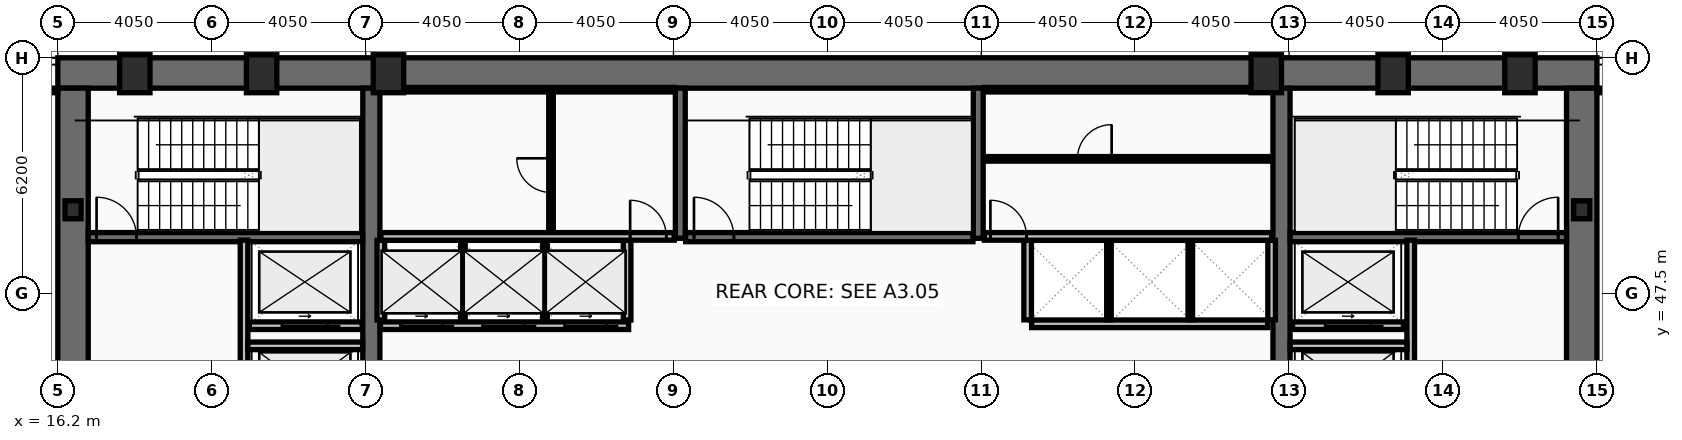
"""IFC4 building model, lengths in metres.
Left out: names, types, materials, properties, quantities, classifications, styles, units other than length and angle.
Written with IfcOpenShell. Run it as: python <this file> out.ifc"""

import sys

from ifc_helpers import new_model, si_unit, direction, frame, frame_2d, origin, origin_2d, place, context, subcontext, project, spatial, rectangle, hollow_rectangle, i_section, extrude, element, fill, save


model = new_model("IFC4")
c1 = context("Model", 3, precision=1e-05, world=origin(), true_north=direction((0.0, 1.0)))
c2 = subcontext(c1, "Body", "Model", "MODEL_VIEW")
j1 = project(units=[si_unit("LENGTHUNIT", "METRE"), si_unit("PLANEANGLEUNIT", "RADIAN")], contexts=[c1])
p1 = place(None, origin())
s1 = spatial("IfcSite", under=j1, at=p1, CompositionType="ELEMENT")
p2 = place(p1, origin())
s2 = spatial("IfcBuilding", under=s1, at=p2, CompositionType="ELEMENT")
p3 = place(p2, frame((0.0, 0.0, 37.8)))
s3 = spatial("IfcBuildingStorey", under=s2, at=p3, CompositionType="ELEMENT", Elevation=37.8)
p4 = place(p3, frame((16.2, 53.3, 0.0), z_axis=(0.0, 0.0, 1.0), x_axis=(1.0, 0.0, 0.0)))
e1 = element("IfcWall", 1, at=p4, inside=s3, PredefinedType="SHEAR", context=c2, shape_type="SweptSolid", body=[
    extrude(rectangle(XDim=40.5, YDim=0.8, at=frame_2d((20.25, 0.0))), origin(), (0.0, 0.0, 1.0), 3.82),
])
for number, where, z_axis, x_axis in (
    (2, (16.6, 42.1, 0.0), (0.0, 0.0, 1.0), (0.0, 1.0, 0.0)),
    (3, (56.3, 52.9, 0.0), (0.0, 0.0, 1.0), (0.0, -1.0, 0.0)),
):
    element("IfcWall", number, at=place(p3, frame(where, z_axis=z_axis, x_axis=x_axis)), inside=s3, PredefinedType="SHEAR", context=c2, shape_type="SweptSolid", body=[
        extrude(rectangle(XDim=10.8, YDim=0.8, at=frame_2d((5.4, 0.0))), origin(), (0.0, 0.0, 1.0), 3.82),
    ])
for number, where, z_axis, x_axis in (
    (4, (24.45, 42.1, 0.0), (0.0, 0.0, 1.0), (0.0, 1.0, 0.0)),
    (5, (48.4, 42.1, 0.0), (0.0, 0.0, 1.0), (0.0, 1.0, 0.0)),
):
    element("IfcWall", number, at=place(p3, frame(where, z_axis=z_axis, x_axis=x_axis)), inside=s3, PredefinedType="SHEAR", context=c2, shape_type="SweptSolid", body=[
        extrude(rectangle(XDim=10.8, YDim=0.45, at=frame_2d((5.4, 0.0))), origin(), (0.0, 0.0, 1.0), 3.82),
    ])
for number, where, z_axis, x_axis in (
    (6, (32.58, 48.95, 0.0), (0.0, 0.0, 1.0), (0.0, 1.0, 0.0)),
    (7, (40.42, 48.95, 0.0), (0.0, 0.0, 1.0), (0.0, 1.0, 0.0)),
):
    element("IfcWall", number, at=place(p3, frame(where, z_axis=z_axis, x_axis=x_axis)), inside=s3, PredefinedType="SHEAR", context=c2, shape_type="SweptSolid", body=[
        extrude(rectangle(XDim=3.95, YDim=0.26, at=frame_2d((1.975, 0.0))), origin(), (0.0, 0.0, 1.0), 3.82),
    ])
p5 = place(p3, frame((17.0, 48.98, 0.0), z_axis=(0.0, 0.0, 1.0), x_axis=(1.0, 0.0, 0.0)))
e8 = element("IfcWall", 8, at=p5, inside=s3, PredefinedType="SHEAR", context=c2, shape_type="SweptSolid", body=[
    extrude(rectangle(XDim=7.22, YDim=0.24, at=frame_2d((3.61, 0.0))), origin(), (0.0, 0.0, 1.0), 3.82),
])
p6 = place(p5, frame((0.22, 0.0, 0.0)))
e9 = element("IfcOpeningElement", 9, at=p6, cuts=e8, PredefinedType="OPENING", context=c2, shape_type="SweptSolid", body=[
    extrude(rectangle(XDim=1.05, YDim=2.15, at=frame_2d((0.525, 1.075))), frame((0.0, 0.13, 0.0), z_axis=(0.0, -1.0, 0.0), x_axis=(1.0, 0.0, 0.0)), (0.0, 0.0, 1.0), 0.26),
])
p7 = place(p3, frame((48.63, 48.98, 0.0), z_axis=(0.0, 0.0, 1.0), x_axis=(1.0, 0.0, 0.0)))
e10 = element("IfcWall", 10, at=p7, inside=s3, PredefinedType="SHEAR", context=c2, shape_type="SweptSolid", body=[
    extrude(rectangle(XDim=7.27, YDim=0.24, at=frame_2d((3.635, 0.0))), origin(), (0.0, 0.0, 1.0), 3.82),
])
p8 = place(p7, frame((6.0, 0.0, 0.0)))
e11 = element("IfcOpeningElement", 11, at=p8, cuts=e10, PredefinedType="OPENING", context=c2, shape_type="SweptSolid", body=[
    extrude(rectangle(XDim=1.05, YDim=2.15, at=frame_2d((0.525, 1.075))), frame((0.0, 0.13, 0.0), z_axis=(0.0, -1.0, 0.0), x_axis=(1.0, 0.0, 0.0)), (0.0, 0.0, 1.0), 0.26),
])
p9 = place(p3, frame((32.72, 48.98, 0.0), z_axis=(0.0, 0.0, 1.0), x_axis=(1.0, 0.0, 0.0)))
e12 = element("IfcWall", 12, at=p9, inside=s3, PredefinedType="SHEAR", context=c2, shape_type="SweptSolid", body=[
    extrude(rectangle(XDim=7.56, YDim=0.24, at=frame_2d((3.78, 0.0))), origin(), (0.0, 0.0, 1.0), 3.82),
])
p10 = place(p9, frame((0.22, 0.0, 0.0)))
e13 = element("IfcOpeningElement", 13, at=p10, cuts=e12, PredefinedType="OPENING", context=c2, shape_type="SweptSolid", body=[
    extrude(rectangle(XDim=1.05, YDim=2.15, at=frame_2d((0.525, 1.075))), frame((0.0, 0.13, 0.0), z_axis=(0.0, -1.0, 0.0), x_axis=(1.0, 0.0, 0.0)), (0.0, 0.0, 1.0), 0.26),
])
for number, where, z_axis, x_axis in (
    (14, (18.225, 53.28, 0.0), (0.0, 0.0, 1.0), (1.0, 0.0, 0.0)),
    (15, (21.562, 53.28, 0.0), (0.0, 0.0, 1.0), (1.0, 0.0, 0.0)),
    (16, (24.9, 53.28, 0.0), (0.0, 0.0, 1.0), (1.0, 0.0, 0.0)),
    (17, (48.0, 53.28, 0.0), (0.0, 0.0, 1.0), (1.0, 0.0, 0.0)),
    (18, (51.337, 53.28, 0.0), (0.0, 0.0, 1.0), (1.0, 0.0, 0.0)),
    (19, (54.675, 53.28, 0.0), (0.0, 0.0, 1.0), (1.0, 0.0, 0.0)),
):
    element("IfcColumn", number, at=place(p3, frame(where, z_axis=z_axis, x_axis=x_axis)), inside=s3, PredefinedType="COLUMN", context=c2, shape_type="SweptSolid", body=[
        extrude(hollow_rectangle(XDim=0.8, YDim=1.0, WallThickness=0.055, at=origin_2d()), origin(), (0.0, 0.0, 1.0), 4.0),
    ])
for number, where, z_axis, x_axis in (
    (20, (16.6, 49.7, 0.0), (0.0, 0.0, 1.0), (1.0, 0.0, 0.0)),
    (21, (56.3, 49.7, 0.0), (0.0, 0.0, 1.0), (1.0, 0.0, 0.0)),
):
    element("IfcColumn", number, at=place(p3, frame(where, z_axis=z_axis, x_axis=x_axis)), inside=s3, PredefinedType="COLUMN", context=c2, shape_type="SweptSolid", body=[
        extrude(i_section(OverallWidth=0.424, OverallDepth=0.474, WebThickness=0.048, FlangeThickness=0.077, at=origin_2d()), origin(), (0.0, 0.0, 1.0), 4.0),
    ])
p11 = place(p3, frame((51.61, 46.65, 0.0), z_axis=(0.0, 0.0, 1.0), x_axis=(-1.0, 0.0, 0.0)))
e22 = element("IfcWall", 22, at=p11, inside=s3, PredefinedType="PARTITIONING", context=c2, shape_type="SweptSolid", body=[
    extrude(rectangle(XDim=2.92, YDim=0.2, at=frame_2d((1.46, 0.0))), origin(), (0.0, 0.0, 1.0), 3.82),
])
p12 = place(p11, frame((0.86, 0.0, 0.0)))
e23 = element("IfcOpeningElement", 23, at=p12, cuts=e22, PredefinedType="OPENING", context=c2, shape_type="SweptSolid", body=[
    extrude(rectangle(XDim=1.2, YDim=2.18, at=frame_2d((0.6, 1.09))), frame((0.0, 0.11, 0.0), z_axis=(0.0, -1.0, 0.0), x_axis=(1.0, 0.0, 0.0)), (0.0, 0.0, 1.0), 0.22),
])
p13 = place(p3, frame((24.21, 46.65, 0.0), z_axis=(0.0, 0.0, 1.0), x_axis=(-1.0, 0.0, 0.0)))
e24 = element("IfcWall", 24, at=p13, inside=s3, PredefinedType="PARTITIONING", context=c2, shape_type="SweptSolid", body=[
    extrude(rectangle(XDim=2.97, YDim=0.2, at=frame_2d((1.485, 0.0))), origin(), (0.0, 0.0, 1.0), 3.82),
])
p14 = place(p13, frame((0.91, 0.0, 0.0)))
e25 = element("IfcOpeningElement", 25, at=p14, cuts=e24, PredefinedType="OPENING", context=c2, shape_type="SweptSolid", body=[
    extrude(rectangle(XDim=1.2, YDim=2.18, at=frame_2d((0.6, 1.09))), frame((0.0, 0.11, 0.0), z_axis=(0.0, -1.0, 0.0), x_axis=(1.0, 0.0, 0.0)), (0.0, 0.0, 1.0), 0.22),
])
p15 = place(p3, frame((31.22, 46.65, 0.0), z_axis=(0.0, 0.0, 1.0), x_axis=(-1.0, 0.0, 0.0)))
e26 = element("IfcWall", 26, at=p15, inside=s3, PredefinedType="PARTITIONING", context=c2, shape_type="SweptSolid", body=[
    extrude(rectangle(XDim=6.53, YDim=0.2, at=frame_2d((3.265, 0.0))), origin(), (0.0, 0.0, 1.0), 3.82),
])
p16 = place(p15, frame((4.9, 0.0, 0.0)))
e27 = element("IfcOpeningElement", 27, at=p16, cuts=e26, PredefinedType="OPENING", context=c2, shape_type="SweptSolid", body=[
    extrude(rectangle(XDim=1.1, YDim=2.18, at=frame_2d((0.55, 1.09))), frame((0.0, 0.11, 0.0), z_axis=(0.0, -1.0, 0.0), x_axis=(1.0, 0.0, 0.0)), (0.0, 0.0, 1.0), 0.22),
])
p17 = place(p15, frame((2.74, 0.0, 0.0)))
e28 = element("IfcOpeningElement", 28, at=p17, cuts=e26, PredefinedType="OPENING", context=c2, shape_type="SweptSolid", body=[
    extrude(rectangle(XDim=1.1, YDim=2.18, at=frame_2d((0.55, 1.09))), frame((0.0, 0.11, 0.0), z_axis=(0.0, -1.0, 0.0), x_axis=(1.0, 0.0, 0.0)), (0.0, 0.0, 1.0), 0.22),
])
p18 = place(p15, frame((0.58, 0.0, 0.0)))
e29 = element("IfcOpeningElement", 29, at=p18, cuts=e26, PredefinedType="OPENING", context=c2, shape_type="SweptSolid", body=[
    extrude(rectangle(XDim=1.1, YDim=2.18, at=frame_2d((0.55, 1.09))), frame((0.0, 0.11, 0.0), z_axis=(0.0, -1.0, 0.0), x_axis=(1.0, 0.0, 0.0)), (0.0, 0.0, 1.0), 0.22),
])
p19 = place(p3, frame((21.1, 44.6, 0.0), z_axis=(0.0, 0.0, 1.0), x_axis=(0.0, 1.0, 0.0)))
e30 = element("IfcWall", 30, at=p19, inside=s3, PredefinedType="PARTITIONING", context=c2, shape_type="SweptSolid", body=[
    extrude(rectangle(XDim=4.3, YDim=0.2, at=frame_2d((2.15, 0.0))), origin(), (0.0, 0.0, 1.0), 3.82),
])
p20 = place(p3, frame((21.2, 46.12, 0.0), z_axis=(0.0, 0.0, 1.0), x_axis=(1.0, 0.0, 0.0)))
e31 = element("IfcWall", 31, at=p20, inside=s3, PredefinedType="PARTITIONING", context=c2, shape_type="SweptSolid", body=[
    extrude(rectangle(XDim=3.02, YDim=0.2, at=frame_2d((1.51, 0.0))), origin(), (0.0, 0.0, 1.0), 3.82),
])
p21 = place(p3, frame((51.8, 44.6, 0.0), z_axis=(0.0, 0.0, 1.0), x_axis=(0.0, 1.0, 0.0)))
e32 = element("IfcWall", 32, at=p21, inside=s3, PredefinedType="PARTITIONING", context=c2, shape_type="SweptSolid", body=[
    extrude(rectangle(XDim=4.3, YDim=0.2, at=frame_2d((2.15, 0.0))), origin(), (0.0, 0.0, 1.0), 3.82),
])
p22 = place(p3, frame((48.63, 46.12, 0.0), z_axis=(0.0, 0.0, 1.0), x_axis=(1.0, 0.0, 0.0)))
e33 = element("IfcWall", 33, at=p22, inside=s3, PredefinedType="PARTITIONING", context=c2, shape_type="SweptSolid", body=[
    extrude(rectangle(XDim=3.07, YDim=0.2, at=frame_2d((1.535, 0.0))), origin(), (0.0, 0.0, 1.0), 3.82),
])
for number, where, z_axis, x_axis in (
    (34, (24.7, 46.8, 0.0), (0.0, 0.0, 1.0), (0.0, 1.0, 0.0)),
    (35, (31.18, 46.8, 0.0), (0.0, 0.0, 1.0), (0.0, 1.0, 0.0)),
):
    element("IfcWall", number, at=place(p3, frame(where, z_axis=z_axis, x_axis=x_axis)), inside=s3, PredefinedType="PARTITIONING", context=c2, shape_type="SweptSolid", body=[
        extrude(rectangle(XDim=2.095, YDim=0.2, at=frame_2d((1.047, 0.0))), origin(), (0.0, 0.0, 1.0), 3.82),
    ])
for number, where, z_axis, x_axis in (
    (36, (26.86, 46.8, 0.0), (0.0, 0.0, 1.0), (0.0, 1.0, 0.0)),
    (37, (29.02, 46.8, 0.0), (0.0, 0.0, 1.0), (0.0, 1.0, 0.0)),
):
    element("IfcWall", number, at=place(p3, frame(where, z_axis=z_axis, x_axis=x_axis)), inside=s3, PredefinedType="PARTITIONING", context=c2, shape_type="SweptSolid", body=[
        extrude(rectangle(XDim=2.095, YDim=0.12, at=frame_2d((1.047, 0.0))), origin(), (0.0, 0.0, 1.0), 3.82),
    ])
p23 = place(p3, frame((41.825, 46.7, 0.0), z_axis=(0.0, 0.0, 1.0), x_axis=(1.0, 0.0, 0.0)))
e38 = element("IfcWall", 38, at=p23, inside=s3, PredefinedType="PARTITIONING", context=c2, shape_type="SweptSolid", body=[
    extrude(rectangle(XDim=6.21, YDim=0.2, at=frame_2d((3.105, 0.0))), origin(), (0.0, 0.0, 1.0), 3.82),
])
for number, where, z_axis, x_axis in (
    (39, (41.72, 46.805, 0.0), (0.0, 0.0, 1.0), (0.0, 1.0, 0.0)),
    (40, (48.14, 46.805, 0.0), (0.0, 0.0, 1.0), (0.0, 1.0, 0.0)),
):
    element("IfcWall", number, at=place(p3, frame(where, z_axis=z_axis, x_axis=x_axis)), inside=s3, PredefinedType="PARTITIONING", context=c2, shape_type="SweptSolid", body=[
        extrude(rectangle(XDim=2.09, YDim=0.2, at=frame_2d((1.045, 0.0))), origin(), (0.0, 0.0, 1.0), 3.82),
    ])
for number, where, z_axis, x_axis in (
    (41, (43.86, 46.805, 0.0), (0.0, 0.0, 1.0), (0.0, 1.0, 0.0)),
    (42, (46.0, 46.805, 0.0), (0.0, 0.0, 1.0), (0.0, 1.0, 0.0)),
):
    element("IfcWall", number, at=place(p3, frame(where, z_axis=z_axis, x_axis=x_axis)), inside=s3, PredefinedType="PARTITIONING", context=c2, shape_type="SweptSolid", body=[
        extrude(rectangle(XDim=2.09, YDim=0.12, at=frame_2d((1.045, 0.0))), origin(), (0.0, 0.0, 1.0), 3.82),
    ])
p24 = place(p3, frame((24.7, 52.86, 0.0), z_axis=(0.0, 0.0, 1.0), x_axis=(1.0, 0.0, 0.0)))
e43 = element("IfcWall", 43, at=p24, inside=s3, PredefinedType="PARTITIONING", context=c2, shape_type="SweptSolid", body=[
    extrude(rectangle(XDim=7.72, YDim=0.12, at=frame_2d((3.86, 0.0))), origin(), (0.0, 0.0, 1.0), 3.82),
])
p25 = place(p3, frame((24.7, 49.0, 0.0), z_axis=(0.0, 0.0, 1.0), x_axis=(1.0, 0.0, 0.0)))
e44 = element("IfcWall", 44, at=p25, inside=s3, PredefinedType="PARTITIONING", context=c2, shape_type="SweptSolid", body=[
    extrude(rectangle(XDim=7.72, YDim=0.2, at=frame_2d((3.86, 0.0))), origin(), (0.0, 0.0, 1.0), 3.82),
])
p26 = place(p25, frame((6.56, 0.0, 0.0)))
e45 = element("IfcOpeningElement", 45, at=p26, cuts=e44, PredefinedType="OPENING", context=c2, shape_type="SweptSolid", body=[
    extrude(rectangle(XDim=0.95, YDim=2.1, at=frame_2d((0.475, 1.05))), frame((0.0, 0.11, 0.0), z_axis=(0.0, -1.0, 0.0), x_axis=(1.0, 0.0, 0.0)), (0.0, 0.0, 1.0), 0.22),
])
p27 = place(p3, frame((29.177, 49.105, 0.0), z_axis=(0.0, 0.0, 1.0), x_axis=(0.0, 1.0, 0.0)))
e46 = element("IfcWall", 46, at=p27, inside=s3, PredefinedType="PARTITIONING", context=c2, shape_type="SweptSolid", body=[
    extrude(rectangle(XDim=3.69, YDim=0.12, at=frame_2d((1.845, 0.0))), origin(), (0.0, 0.0, 1.0), 3.82),
])
p28 = place(p27, frame((1.05, 0.0, 0.0)))
e47 = element("IfcOpeningElement", 47, at=p28, cuts=e46, PredefinedType="OPENING", context=c2, shape_type="SweptSolid", body=[
    extrude(rectangle(XDim=0.9, YDim=2.05, at=frame_2d((0.45, 1.025))), frame((0.0, 0.07, 0.0), z_axis=(0.0, -1.0, 0.0), x_axis=(1.0, 0.0, 0.0)), (0.0, 0.0, 1.0), 0.14),
])
p29 = place(p3, frame((40.58, 52.86, 0.0), z_axis=(0.0, 0.0, 1.0), x_axis=(1.0, 0.0, 0.0)))
e48 = element("IfcWall", 48, at=p29, inside=s3, PredefinedType="PARTITIONING", context=c2, shape_type="SweptSolid", body=[
    extrude(rectangle(XDim=7.56, YDim=0.12, at=frame_2d((3.78, 0.0))), origin(), (0.0, 0.0, 1.0), 3.82),
])
p30 = place(p3, frame((40.58, 49.0, 0.0), z_axis=(0.0, 0.0, 1.0), x_axis=(1.0, 0.0, 0.0)))
e49 = element("IfcWall", 49, at=p30, inside=s3, PredefinedType="PARTITIONING", context=c2, shape_type="SweptSolid", body=[
    extrude(rectangle(XDim=7.56, YDim=0.2, at=frame_2d((3.78, 0.0))), origin(), (0.0, 0.0, 1.0), 3.82),
])
p31 = place(p30, frame((0.16, 0.0, 0.0)))
e50 = element("IfcOpeningElement", 50, at=p31, cuts=e49, PredefinedType="OPENING", context=c2, shape_type="SweptSolid", body=[
    extrude(rectangle(XDim=0.95, YDim=2.1, at=frame_2d((0.475, 1.05))), frame((0.0, 0.11, 0.0), z_axis=(0.0, -1.0, 0.0), x_axis=(1.0, 0.0, 0.0)), (0.0, 0.0, 1.0), 0.22),
])
p32 = place(p3, frame((40.63, 51.04, 0.0), z_axis=(0.0, 0.0, 1.0), x_axis=(1.0, 0.0, 0.0)))
e51 = element("IfcWall", 51, at=p32, inside=s3, PredefinedType="PARTITIONING", context=c2, shape_type="SweptSolid", body=[
    extrude(rectangle(XDim=7.46, YDim=0.12, at=frame_2d((3.73, 0.0))), origin(), (0.0, 0.0, 1.0), 3.82),
])
p33 = place(p32, frame((2.4, 0.0, 0.0)))
e52 = element("IfcOpeningElement", 52, at=p33, cuts=e51, PredefinedType="OPENING", context=c2, shape_type="SweptSolid", body=[
    extrude(rectangle(XDim=0.9, YDim=2.05, at=frame_2d((0.45, 1.025))), frame((0.0, 0.07, 0.0), z_axis=(0.0, -1.0, 0.0), x_axis=(1.0, 0.0, 0.0)), (0.0, 0.0, 1.0), 0.14),
])
for number, where, z_axis, x_axis in (
    (53, (2.095, 52.84, 0.0), (0.0, 0.0, 1.0), (1.0, 0.0, 0.0)),
    (54, (56.7, 52.84, 0.0), (0.0, 0.0, 1.0), (1.0, 0.0, 0.0)),
):
    element("IfcWall", number, at=place(p3, frame(where, z_axis=z_axis, x_axis=x_axis)), inside=s3, PredefinedType="PARTITIONING", context=c2, shape_type="SweptSolid", body=[
        extrude(rectangle(XDim=14.105, YDim=0.12, at=frame_2d((7.052, 0.0))), origin(), (0.0, 0.0, 1.0), 3.82),
    ])
p34 = place(p6, origin())
e55 = element("IfcDoor", 55, at=p34, inside=s3, OperationType="SINGLE_SWING_LEFT", PredefinedType="DOOR", context=c2, shape_type="SweptSolid", body=[
    extrude(rectangle(XDim=1.05, YDim=2.15, at=frame_2d((0.525, 1.075))), frame((0.0, 0.025, 0.0), z_axis=(0.0, -1.0, 0.0), x_axis=(1.0, 0.0, 0.0)), (0.0, 0.0, 1.0), 0.05),
])
fill(e9, e55)
p35 = place(p8, origin())
e56 = element("IfcDoor", 56, at=p35, inside=s3, OperationType="SINGLE_SWING_RIGHT", PredefinedType="DOOR", context=c2, shape_type="SweptSolid", body=[
    extrude(rectangle(XDim=1.05, YDim=2.15, at=frame_2d((0.525, 1.075))), frame((0.0, 0.025, 0.0), z_axis=(0.0, -1.0, 0.0), x_axis=(1.0, 0.0, 0.0)), (0.0, 0.0, 1.0), 0.05),
])
fill(e11, e56)
p36 = place(p10, origin())
e57 = element("IfcDoor", 57, at=p36, inside=s3, OperationType="SINGLE_SWING_LEFT", PredefinedType="DOOR", context=c2, shape_type="SweptSolid", body=[
    extrude(rectangle(XDim=1.05, YDim=2.15, at=frame_2d((0.525, 1.075))), frame((0.0, 0.025, 0.0), z_axis=(0.0, -1.0, 0.0), x_axis=(1.0, 0.0, 0.0)), (0.0, 0.0, 1.0), 0.05),
])
fill(e13, e57)
p37 = place(p12, origin())
e58 = element("IfcDoor", 58, at=p37, inside=s3, OperationType="SLIDING_TO_LEFT", PredefinedType="DOOR", context=c2, shape_type="SweptSolid", body=[
    extrude(rectangle(XDim=1.2, YDim=2.18, at=frame_2d((0.6, 1.09))), frame((0.0, 0.025, 0.0), z_axis=(0.0, -1.0, 0.0), x_axis=(1.0, 0.0, 0.0)), (0.0, 0.0, 1.0), 0.05),
])
fill(e23, e58)
p38 = place(p14, origin())
e59 = element("IfcDoor", 59, at=p38, inside=s3, OperationType="SLIDING_TO_LEFT", PredefinedType="DOOR", context=c2, shape_type="SweptSolid", body=[
    extrude(rectangle(XDim=1.2, YDim=2.18, at=frame_2d((0.6, 1.09))), frame((0.0, 0.025, 0.0), z_axis=(0.0, -1.0, 0.0), x_axis=(1.0, 0.0, 0.0)), (0.0, 0.0, 1.0), 0.05),
])
fill(e25, e59)
p39 = place(p16, origin())
e60 = element("IfcDoor", 60, at=p39, inside=s3, OperationType="SLIDING_TO_LEFT", PredefinedType="DOOR", context=c2, shape_type="SweptSolid", body=[
    extrude(rectangle(XDim=1.1, YDim=2.18, at=frame_2d((0.55, 1.09))), frame((0.0, 0.025, 0.0), z_axis=(0.0, -1.0, 0.0), x_axis=(1.0, 0.0, 0.0)), (0.0, 0.0, 1.0), 0.05),
])
fill(e27, e60)
p40 = place(p17, origin())
e61 = element("IfcDoor", 61, at=p40, inside=s3, OperationType="SLIDING_TO_LEFT", PredefinedType="DOOR", context=c2, shape_type="SweptSolid", body=[
    extrude(rectangle(XDim=1.1, YDim=2.18, at=frame_2d((0.55, 1.09))), frame((0.0, 0.025, 0.0), z_axis=(0.0, -1.0, 0.0), x_axis=(1.0, 0.0, 0.0)), (0.0, 0.0, 1.0), 0.05),
])
fill(e28, e61)
p41 = place(p18, origin())
e62 = element("IfcDoor", 62, at=p41, inside=s3, OperationType="SLIDING_TO_LEFT", PredefinedType="DOOR", context=c2, shape_type="SweptSolid", body=[
    extrude(rectangle(XDim=1.1, YDim=2.18, at=frame_2d((0.55, 1.09))), frame((0.0, 0.025, 0.0), z_axis=(0.0, -1.0, 0.0), x_axis=(1.0, 0.0, 0.0)), (0.0, 0.0, 1.0), 0.05),
])
fill(e29, e62)
p42 = place(p26, origin())
e63 = element("IfcDoor", 63, at=p42, inside=s3, OperationType="SINGLE_SWING_LEFT", PredefinedType="DOOR", context=c2, shape_type="SweptSolid", body=[
    extrude(rectangle(XDim=0.95, YDim=2.1, at=frame_2d((0.475, 1.05))), frame((0.0, 0.025, 0.0), z_axis=(0.0, -1.0, 0.0), x_axis=(1.0, 0.0, 0.0)), (0.0, 0.0, 1.0), 0.05),
])
fill(e45, e63)
p43 = place(p28, origin())
e64 = element("IfcDoor", 64, at=p43, inside=s3, OperationType="SINGLE_SWING_RIGHT", PredefinedType="DOOR", context=c2, shape_type="SweptSolid", body=[
    extrude(rectangle(XDim=0.9, YDim=2.05, at=frame_2d((0.45, 1.025))), frame((0.0, 0.025, 0.0), z_axis=(0.0, -1.0, 0.0), x_axis=(1.0, 0.0, 0.0)), (0.0, 0.0, 1.0), 0.05),
])
fill(e47, e64)
p44 = place(p31, origin())
e65 = element("IfcDoor", 65, at=p44, inside=s3, OperationType="SINGLE_SWING_LEFT", PredefinedType="DOOR", context=c2, shape_type="SweptSolid", body=[
    extrude(rectangle(XDim=0.95, YDim=2.1, at=frame_2d((0.475, 1.05))), frame((0.0, 0.025, 0.0), z_axis=(0.0, -1.0, 0.0), x_axis=(1.0, 0.0, 0.0)), (0.0, 0.0, 1.0), 0.05),
])
fill(e50, e65)
p45 = place(p33, origin())
e66 = element("IfcDoor", 66, at=p45, inside=s3, OperationType="SINGLE_SWING_RIGHT", PredefinedType="DOOR", context=c2, shape_type="SweptSolid", body=[
    extrude(rectangle(XDim=0.9, YDim=2.05, at=frame_2d((0.45, 1.025))), frame((0.0, 0.025, 0.0), z_axis=(0.0, -1.0, 0.0), x_axis=(1.0, 0.0, 0.0)), (0.0, 0.0, 1.0), 0.05),
])
fill(e52, e66)
save(model, sys.argv[1])
